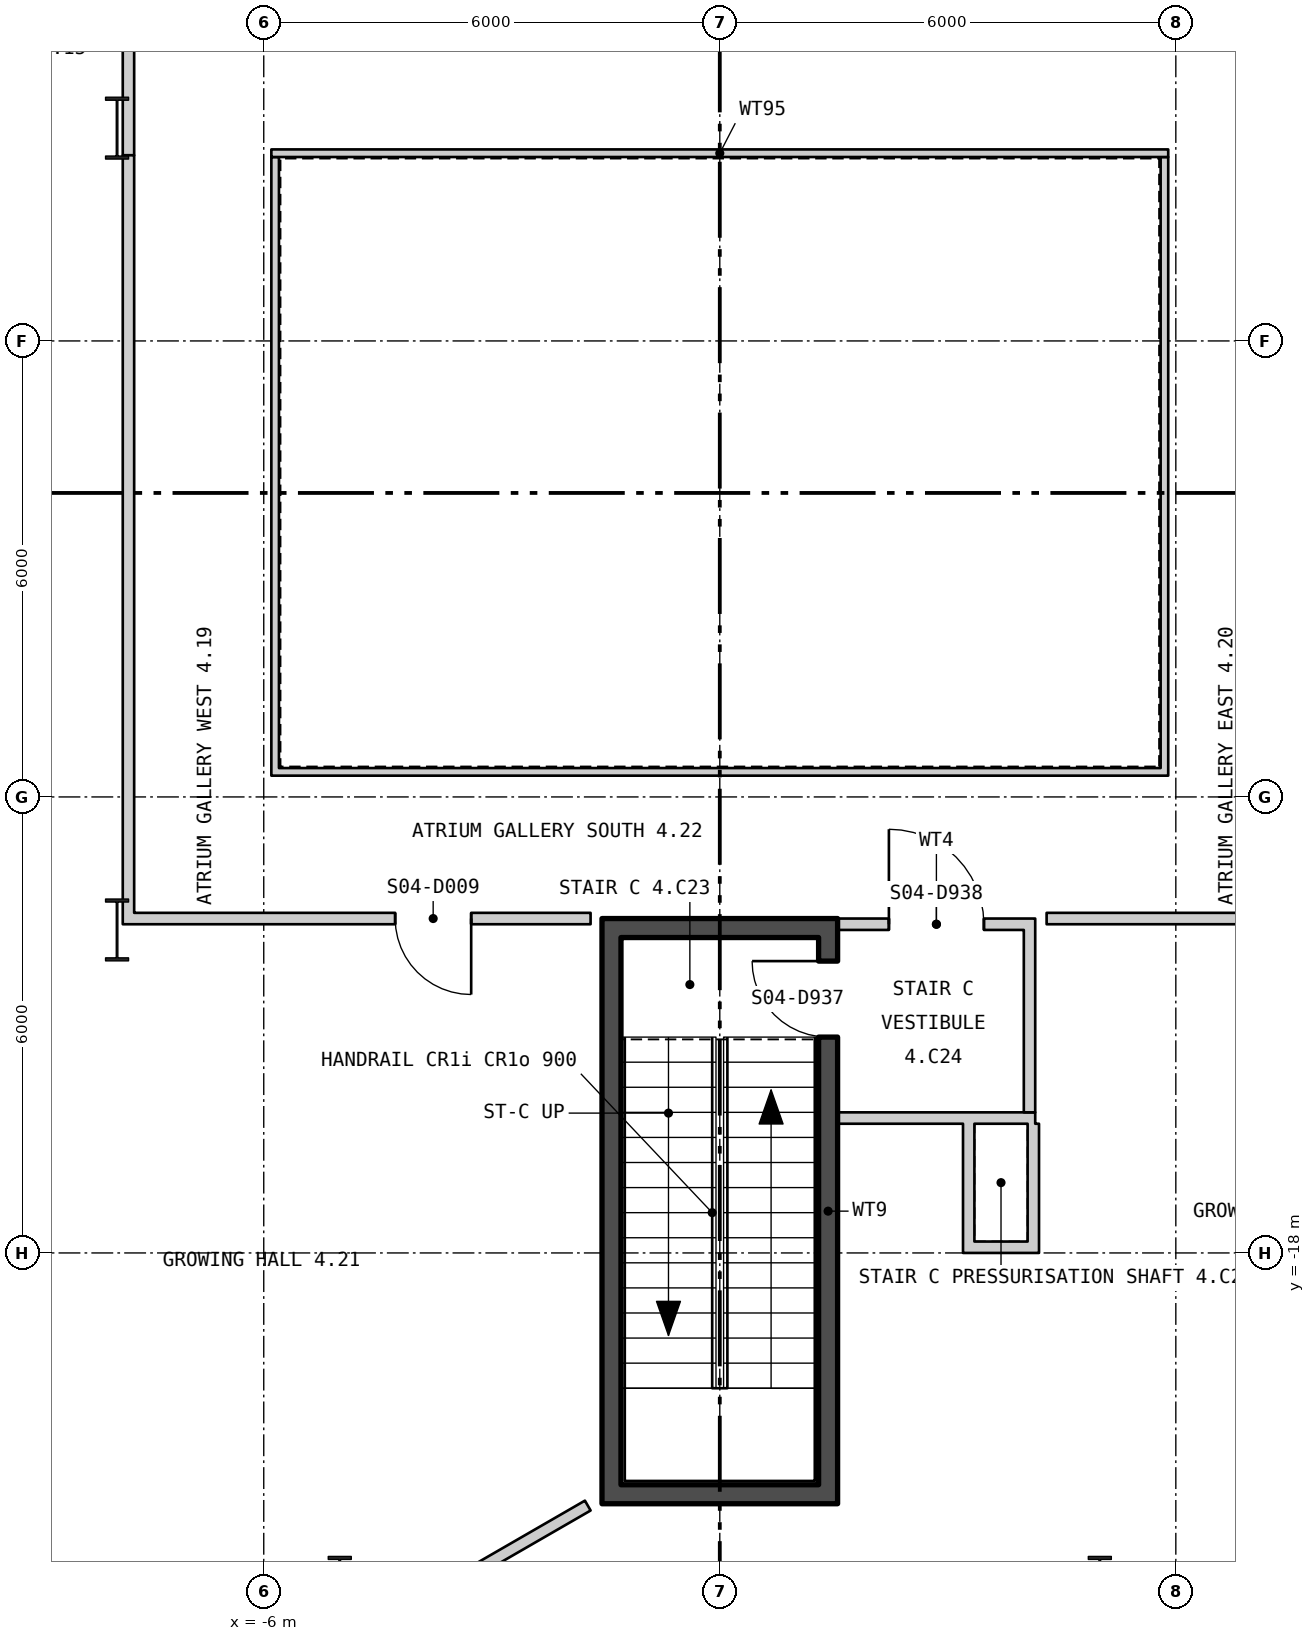
"""IFC4 building model, lengths in metres.
Left out: names, types, materials, properties, quantities, classifications, styles, units other than length and angle.
Written with IfcOpenShell. Run it as: python <this file> out.ifc"""

import sys

from ifc_helpers import new_model, si_unit, direction, frame, frame_2d, origin, origin_2d, place, context, subcontext, project, spatial, polyline, rectangle, i_section, outline, extrude, element, fill, save


model = new_model("IFC4")
c1 = context("Model", 3, precision=1e-05, world=origin(), true_north=direction((0.0, 1.0)))
c2 = subcontext(c1, "Body", "Model", "MODEL_VIEW")
j1 = project(units=[si_unit("LENGTHUNIT", "METRE"), si_unit("PLANEANGLEUNIT", "RADIAN")], contexts=[c1])
p1 = place(None, origin())
s1 = spatial("IfcSite", under=j1, at=p1, CompositionType="ELEMENT")
p2 = place(p1, origin())
s2 = spatial("IfcBuilding", under=s1, at=p2, CompositionType="ELEMENT")
p3 = place(p2, frame((0.0, 0.0, 60.3)))
s3 = spatial("IfcBuildingStorey", under=s2, at=p3, CompositionType="ELEMENT", Elevation=60.3)
for number, where, z_axis, x_axis in (
    (1, (-7.93, -3.2, 0.0), (0.0, 0.0, 1.0), (1.0, 0.0, 0.0)),
    (2, (-7.93, -13.75, 0.0), (0.0, 0.0, 1.0), (1.0, 0.0, 0.0)),
    (3, (5.0, -22.4, 0.0), (0.0, 0.0, 1.0), (1.0, 0.0, 0.0)),
    (4, (-5.0, -22.4, 0.0), (0.0, 0.0, 1.0), (1.0, 0.0, 0.0)),
):
    element("IfcColumn", number, at=place(p3, frame(where, z_axis=z_axis, x_axis=x_axis)), inside=s3, PredefinedType="COLUMN", context=c2, shape_type="SweptSolid", body=[
        extrude(i_section(OverallWidth=0.303, OverallDepth=0.814, WebThickness=0.021, FlangeThickness=0.04, at=origin_2d()), origin(), (0.0, 0.0, 1.0), 4.5),
    ])
p4 = place(p3, frame((-28.3, 10.579, -0.18), z_axis=(0.0, 0.0, 1.0), x_axis=(0.499999388847, -0.866025756634, 0.0)))
e5 = element("IfcWall", 5, at=p4, inside=s3, PredefinedType="SOLIDWALL", context=c2, shape_type="SweptSolid", body=[
    extrude(outline(polyline([(-0.13, -0.225), (45.88, -0.225), (45.62, 0.225), (0.13, 0.225), (-0.13, -0.225)])), origin(), (0.0, 0.0, 1.0), 4.28),
])
p5 = place(p4, frame((1.425, 0.0, 1.08)))
e6 = element("IfcOpeningElement", 6, at=p5, cuts=e5, PredefinedType="OPENING", context=c2, shape_type="SweptSolid", body=[
    extrude(rectangle(XDim=2.4, YDim=2.6, at=frame_2d((1.2, 1.3))), frame((0.0, 0.235, 0.0), z_axis=(0.0, -1.0, 0.0), x_axis=(1.0, 0.0, 0.0)), (0.0, 0.0, 1.0), 0.47),
])
p6 = place(p4, frame((5.895, 0.0, 1.08)))
e7 = element("IfcOpeningElement", 7, at=p6, cuts=e5, PredefinedType="OPENING", context=c2, shape_type="SweptSolid", body=[
    extrude(rectangle(XDim=2.4, YDim=2.6, at=frame_2d((1.2, 1.3))), frame((0.0, 0.235, 0.0), z_axis=(0.0, -1.0, 0.0), x_axis=(1.0, 0.0, 0.0)), (0.0, 0.0, 1.0), 0.47),
])
p7 = place(p4, frame((10.403, 0.0, 1.08)))
e8 = element("IfcOpeningElement", 8, at=p7, cuts=e5, PredefinedType="OPENING", context=c2, shape_type="SweptSolid", body=[
    extrude(rectangle(XDim=2.4, YDim=2.6, at=frame_2d((1.2, 1.3))), frame((0.0, 0.235, 0.0), z_axis=(0.0, -1.0, 0.0), x_axis=(1.0, 0.0, 0.0)), (0.0, 0.0, 1.0), 0.47),
])
p8 = place(p4, frame((14.912, 0.0, 1.08)))
e9 = element("IfcOpeningElement", 9, at=p8, cuts=e5, PredefinedType="OPENING", context=c2, shape_type="SweptSolid", body=[
    extrude(rectangle(XDim=2.4, YDim=2.6, at=frame_2d((1.2, 1.3))), frame((0.0, 0.235, 0.0), z_axis=(0.0, -1.0, 0.0), x_axis=(1.0, 0.0, 0.0)), (0.0, 0.0, 1.0), 0.47),
])
p9 = place(p4, frame((19.421, 0.0, 1.08)))
e10 = element("IfcOpeningElement", 10, at=p9, cuts=e5, PredefinedType="OPENING", context=c2, shape_type="SweptSolid", body=[
    extrude(rectangle(XDim=2.4, YDim=2.6, at=frame_2d((1.2, 1.3))), frame((0.0, 0.235, 0.0), z_axis=(0.0, -1.0, 0.0), x_axis=(1.0, 0.0, 0.0)), (0.0, 0.0, 1.0), 0.47),
])
p10 = place(p4, frame((23.929, 0.0, 1.08)))
e11 = element("IfcOpeningElement", 11, at=p10, cuts=e5, PredefinedType="OPENING", context=c2, shape_type="SweptSolid", body=[
    extrude(rectangle(XDim=2.4, YDim=2.6, at=frame_2d((1.2, 1.3))), frame((0.0, 0.235, 0.0), z_axis=(0.0, -1.0, 0.0), x_axis=(1.0, 0.0, 0.0)), (0.0, 0.0, 1.0), 0.47),
])
p11 = place(p4, frame((28.438, 0.0, 1.08)))
e12 = element("IfcOpeningElement", 12, at=p11, cuts=e5, PredefinedType="OPENING", context=c2, shape_type="SweptSolid", body=[
    extrude(rectangle(XDim=2.4, YDim=2.6, at=frame_2d((1.2, 1.3))), frame((0.0, 0.235, 0.0), z_axis=(0.0, -1.0, 0.0), x_axis=(1.0, 0.0, 0.0)), (0.0, 0.0, 1.0), 0.47),
])
p12 = place(p4, frame((32.947, 0.0, 1.08)))
e13 = element("IfcOpeningElement", 13, at=p12, cuts=e5, PredefinedType="OPENING", context=c2, shape_type="SweptSolid", body=[
    extrude(rectangle(XDim=2.4, YDim=2.6, at=frame_2d((1.2, 1.3))), frame((0.0, 0.235, 0.0), z_axis=(0.0, -1.0, 0.0), x_axis=(1.0, 0.0, 0.0)), (0.0, 0.0, 1.0), 0.47),
])
p13 = place(p4, frame((37.455, 0.0, 1.08)))
e14 = element("IfcOpeningElement", 14, at=p13, cuts=e5, PredefinedType="OPENING", context=c2, shape_type="SweptSolid", body=[
    extrude(rectangle(XDim=2.4, YDim=2.6, at=frame_2d((1.2, 1.3))), frame((0.0, 0.235, 0.0), z_axis=(0.0, -1.0, 0.0), x_axis=(1.0, 0.0, 0.0)), (0.0, 0.0, 1.0), 0.47),
])
p14 = place(p4, frame((41.925, 0.0, 1.08)))
e15 = element("IfcOpeningElement", 15, at=p14, cuts=e5, PredefinedType="OPENING", context=c2, shape_type="SweptSolid", body=[
    extrude(rectangle(XDim=2.4, YDim=2.6, at=frame_2d((1.2, 1.3))), frame((0.0, 0.235, 0.0), z_axis=(0.0, -1.0, 0.0), x_axis=(1.0, 0.0, 0.0)), (0.0, 0.0, 1.0), 0.47),
])
p15 = place(p3, frame((5.425, -29.042, -0.18), z_axis=(0.0, 0.0, 1.0), x_axis=(0.499999388847, 0.866025756634, 0.0)))
e16 = element("IfcWall", 16, at=p15, inside=s3, PredefinedType="SOLIDWALL", context=c2, shape_type="SweptSolid", body=[
    extrude(outline(polyline([(-0.13, -0.225), (45.88, -0.225), (45.62, 0.225), (0.13, 0.225), (-0.13, -0.225)])), origin(), (0.0, 0.0, 1.0), 4.28),
])
p16 = place(p15, frame((1.425, 0.0, 1.08)))
e17 = element("IfcOpeningElement", 17, at=p16, cuts=e16, PredefinedType="OPENING", context=c2, shape_type="SweptSolid", body=[
    extrude(rectangle(XDim=2.4, YDim=2.6, at=frame_2d((1.2, 1.3))), frame((0.0, 0.235, 0.0), z_axis=(0.0, -1.0, 0.0), x_axis=(1.0, 0.0, 0.0)), (0.0, 0.0, 1.0), 0.47),
])
p17 = place(p15, frame((5.895, 0.0, 1.08)))
e18 = element("IfcOpeningElement", 18, at=p17, cuts=e16, PredefinedType="OPENING", context=c2, shape_type="SweptSolid", body=[
    extrude(rectangle(XDim=2.4, YDim=2.6, at=frame_2d((1.2, 1.3))), frame((0.0, 0.235, 0.0), z_axis=(0.0, -1.0, 0.0), x_axis=(1.0, 0.0, 0.0)), (0.0, 0.0, 1.0), 0.47),
])
p18 = place(p15, frame((10.403, 0.0, 1.08)))
e19 = element("IfcOpeningElement", 19, at=p18, cuts=e16, PredefinedType="OPENING", context=c2, shape_type="SweptSolid", body=[
    extrude(rectangle(XDim=2.4, YDim=2.6, at=frame_2d((1.2, 1.3))), frame((0.0, 0.235, 0.0), z_axis=(0.0, -1.0, 0.0), x_axis=(1.0, 0.0, 0.0)), (0.0, 0.0, 1.0), 0.47),
])
p19 = place(p15, frame((14.912, 0.0, 1.08)))
e20 = element("IfcOpeningElement", 20, at=p19, cuts=e16, PredefinedType="OPENING", context=c2, shape_type="SweptSolid", body=[
    extrude(rectangle(XDim=2.4, YDim=2.6, at=frame_2d((1.2, 1.3))), frame((0.0, 0.235, 0.0), z_axis=(0.0, -1.0, 0.0), x_axis=(1.0, 0.0, 0.0)), (0.0, 0.0, 1.0), 0.47),
])
p20 = place(p15, frame((19.421, 0.0, 1.08)))
e21 = element("IfcOpeningElement", 21, at=p20, cuts=e16, PredefinedType="OPENING", context=c2, shape_type="SweptSolid", body=[
    extrude(rectangle(XDim=2.4, YDim=2.6, at=frame_2d((1.2, 1.3))), frame((0.0, 0.235, 0.0), z_axis=(0.0, -1.0, 0.0), x_axis=(1.0, 0.0, 0.0)), (0.0, 0.0, 1.0), 0.47),
])
p21 = place(p15, frame((23.929, 0.0, 1.08)))
e22 = element("IfcOpeningElement", 22, at=p21, cuts=e16, PredefinedType="OPENING", context=c2, shape_type="SweptSolid", body=[
    extrude(rectangle(XDim=2.4, YDim=2.6, at=frame_2d((1.2, 1.3))), frame((0.0, 0.235, 0.0), z_axis=(0.0, -1.0, 0.0), x_axis=(1.0, 0.0, 0.0)), (0.0, 0.0, 1.0), 0.47),
])
p22 = place(p15, frame((28.438, 0.0, 1.08)))
e23 = element("IfcOpeningElement", 23, at=p22, cuts=e16, PredefinedType="OPENING", context=c2, shape_type="SweptSolid", body=[
    extrude(rectangle(XDim=2.4, YDim=2.6, at=frame_2d((1.2, 1.3))), frame((0.0, 0.235, 0.0), z_axis=(0.0, -1.0, 0.0), x_axis=(1.0, 0.0, 0.0)), (0.0, 0.0, 1.0), 0.47),
])
p23 = place(p15, frame((32.947, 0.0, 1.08)))
e24 = element("IfcOpeningElement", 24, at=p23, cuts=e16, PredefinedType="OPENING", context=c2, shape_type="SweptSolid", body=[
    extrude(rectangle(XDim=2.4, YDim=2.6, at=frame_2d((1.2, 1.3))), frame((0.0, 0.235, 0.0), z_axis=(0.0, -1.0, 0.0), x_axis=(1.0, 0.0, 0.0)), (0.0, 0.0, 1.0), 0.47),
])
p24 = place(p15, frame((37.455, 0.0, 1.08)))
e25 = element("IfcOpeningElement", 25, at=p24, cuts=e16, PredefinedType="OPENING", context=c2, shape_type="SweptSolid", body=[
    extrude(rectangle(XDim=2.4, YDim=2.6, at=frame_2d((1.2, 1.3))), frame((0.0, 0.235, 0.0), z_axis=(0.0, -1.0, 0.0), x_axis=(1.0, 0.0, 0.0)), (0.0, 0.0, 1.0), 0.47),
])
p25 = place(p15, frame((41.925, 0.0, 1.08)))
e26 = element("IfcOpeningElement", 26, at=p25, cuts=e16, PredefinedType="OPENING", context=c2, shape_type="SweptSolid", body=[
    extrude(rectangle(XDim=2.4, YDim=2.6, at=frame_2d((1.2, 1.3))), frame((0.0, 0.235, 0.0), z_axis=(0.0, -1.0, 0.0), x_axis=(1.0, 0.0, 0.0)), (0.0, 0.0, 1.0), 0.47),
])
p26 = place(p3, frame((-5.9, -11.67, 0.0), z_axis=(0.0, 0.0, 1.0), x_axis=(1.0, 0.0, 0.0)))
e27 = element("IfcWall", 27, at=p26, inside=s3, PredefinedType="PARTITIONING", context=c2, shape_type="SweptSolid", body=[
    extrude(rectangle(XDim=11.8, YDim=0.1, at=frame_2d((5.9, 0.0))), origin(), (0.0, 0.0, 1.0), 4.3),
])
p27 = place(p3, frame((5.85, -11.62, 0.0), z_axis=(0.0, 0.0, 1.0), x_axis=(0.0, 1.0, 0.0)))
e28 = element("IfcWall", 28, at=p27, inside=s3, PredefinedType="PARTITIONING", context=c2, shape_type="SweptSolid", body=[
    extrude(rectangle(XDim=8.04, YDim=0.1, at=frame_2d((4.02, 0.0))), origin(), (0.0, 0.0, 1.0), 4.3),
])
p28 = place(p3, frame((5.9, -3.53, 0.0), z_axis=(0.0, 0.0, 1.0), x_axis=(-1.0, 0.0, 0.0)))
e29 = element("IfcWall", 29, at=p28, inside=s3, PredefinedType="PARTITIONING", context=c2, shape_type="SweptSolid", body=[
    extrude(rectangle(XDim=11.8, YDim=0.1, at=frame_2d((5.9, 0.0))), origin(), (0.0, 0.0, 1.0), 4.3),
])
p29 = place(p3, frame((-5.85, -3.58, 0.0), z_axis=(0.0, 0.0, 1.0), x_axis=(0.0, -1.0, 0.0)))
e30 = element("IfcWall", 30, at=p29, inside=s3, PredefinedType="PARTITIONING", context=c2, shape_type="SweptSolid", body=[
    extrude(rectangle(XDim=8.04, YDim=0.1, at=frame_2d((4.02, 0.0))), origin(), (0.0, 0.0, 1.0), 4.3),
])
p30 = place(p3, frame((-1.425, -21.05, 0.0), z_axis=(0.0, 0.0, 1.0), x_axis=(0.0, 1.0, 0.0)))
e31 = element("IfcWall", 31, at=p30, inside=s3, PredefinedType="SHEAR", context=c2, shape_type="SweptSolid", body=[
    extrude(rectangle(XDim=7.2, YDim=0.25, at=frame_2d((3.6, 0.0))), origin(), (0.0, 0.0, 1.0), 4.3),
])
p31 = place(p3, frame((1.425, -21.05, 0.0), z_axis=(0.0, 0.0, 1.0), x_axis=(0.0, 1.0, 0.0)))
e32 = element("IfcWall", 32, at=p31, inside=s3, PredefinedType="SHEAR", context=c2, shape_type="SweptSolid", body=[
    extrude(rectangle(XDim=7.2, YDim=0.25, at=frame_2d((3.6, 0.0))), origin(), (0.0, 0.0, 1.0), 4.3),
])
p32 = place(p31, frame((5.89, 0.0, 0.0)))
e33 = element("IfcOpeningElement", 33, at=p32, cuts=e32, PredefinedType="OPENING", context=c2, shape_type="SweptSolid", body=[
    extrude(rectangle(XDim=1.0, YDim=2.1, at=frame_2d((0.5, 1.05))), frame((0.0, 0.135, 0.0), z_axis=(0.0, -1.0, 0.0), x_axis=(1.0, 0.0, 0.0)), (0.0, 0.0, 1.0), 0.27),
])
for number, where, z_axis, x_axis in (
    (34, (-1.55, -21.175, 0.0), (0.0, 0.0, 1.0), (1.0, 0.0, 0.0)),
    (35, (-1.55, -13.725, 0.0), (0.0, 0.0, 1.0), (1.0, 0.0, 0.0)),
):
    element("IfcWall", number, at=place(p3, frame(where, z_axis=z_axis, x_axis=x_axis)), inside=s3, PredefinedType="SHEAR", context=c2, shape_type="SweptSolid", body=[
        extrude(rectangle(XDim=3.1, YDim=0.25, at=frame_2d((1.55, 0.0))), origin(), (0.0, 0.0, 1.0), 4.3),
    ])
p33 = place(p3, frame((1.55, -16.225, 0.0), z_axis=(0.0, 0.0, 1.0), x_axis=(1.0, 0.0, 0.0)))
e36 = element("IfcWall", 36, at=p33, inside=s3, PredefinedType="PARTITIONING", context=c2, shape_type="SweptSolid", body=[
    extrude(rectangle(XDim=2.6, YDim=0.15, at=frame_2d((1.3, 0.0))), origin(), (0.0, 0.0, 1.0), 4.3),
])
p34 = place(p3, frame((4.075, -16.15, 0.0), z_axis=(0.0, 0.0, 1.0), x_axis=(0.0, 1.0, 0.0)))
e37 = element("IfcWall", 37, at=p34, inside=s3, PredefinedType="PARTITIONING", context=c2, shape_type="SweptSolid", body=[
    extrude(rectangle(XDim=2.4, YDim=0.15, at=frame_2d((1.2, 0.0))), origin(), (0.0, 0.0, 1.0), 4.3),
])
p35 = place(p3, frame((1.55, -13.675, 0.0), z_axis=(0.0, 0.0, 1.0), x_axis=(1.0, 0.0, 0.0)))
e38 = element("IfcWall", 38, at=p35, inside=s3, PredefinedType="PARTITIONING", context=c2, shape_type="SweptSolid", body=[
    extrude(rectangle(XDim=2.6, YDim=0.15, at=frame_2d((1.3, 0.0))), origin(), (0.0, 0.0, 1.0), 3.39),
])
p36 = place(p35, frame((0.675, 0.0, 0.0)))
e39 = element("IfcOpeningElement", 39, at=p36, cuts=e38, PredefinedType="OPENING", context=c2, shape_type="SweptSolid", body=[
    extrude(rectangle(XDim=1.25, YDim=2.1, at=frame_2d((0.625, 1.05))), frame((0.0, 0.085, 0.0), z_axis=(0.0, -1.0, 0.0), x_axis=(1.0, 0.0, 0.0)), (0.0, 0.0, 1.0), 0.17),
])
p37 = place(p3, frame((3.275, -18.0, 0.0), z_axis=(0.0, 0.0, 1.0), x_axis=(0.0, 1.0, 0.0)))
e40 = element("IfcWall", 40, at=p37, inside=s3, PredefinedType="PARTITIONING", context=c2, shape_type="SweptSolid", body=[
    extrude(rectangle(XDim=1.7, YDim=0.15, at=frame_2d((0.85, 0.0))), origin(), (0.0, 0.0, 1.0), 3.7),
])
p38 = place(p3, frame((3.35, -17.925, 0.0), z_axis=(0.0, 0.0, 1.0), x_axis=(1.0, 0.0, 0.0)))
e41 = element("IfcWall", 41, at=p38, inside=s3, PredefinedType="PARTITIONING", context=c2, shape_type="SweptSolid", body=[
    extrude(rectangle(XDim=0.7, YDim=0.15, at=frame_2d((0.35, 0.0))), origin(), (0.0, 0.0, 1.0), 4.3),
])
p39 = place(p3, frame((4.125, -18.0, 0.0), z_axis=(0.0, 0.0, 1.0), x_axis=(0.0, 1.0, 0.0)))
e42 = element("IfcWall", 42, at=p39, inside=s3, PredefinedType="PARTITIONING", context=c2, shape_type="SweptSolid", body=[
    extrude(rectangle(XDim=1.7, YDim=0.15, at=frame_2d((0.85, 0.0))), origin(), (0.0, 0.0, 1.0), 4.3),
])
p40 = place(p3, frame((-7.78, -13.675, 0.0), z_axis=(0.0, 0.0, 1.0), x_axis=(0.0, 1.0, 0.0)))
e43 = element("IfcWall", 43, at=p40, inside=s3, PredefinedType="PARTITIONING", context=c2, shape_type="SweptSolid", body=[
    extrude(rectangle(XDim=10.118, YDim=0.15, at=frame_2d((5.059, 0.0))), origin(), (0.0, 0.0, 1.0), 3.61),
])
p41 = place(p3, frame((-7.78, -3.557, 0.0), z_axis=(0.0, 0.0, 1.0), x_axis=(0.0, 1.0, 0.0)))
e44 = element("IfcWall", 44, at=p41, inside=s3, PredefinedType="PARTITIONING", context=c2, shape_type="SweptSolid", body=[
    extrude(rectangle(XDim=3.557, YDim=0.15, at=frame_2d((1.778, 0.0))), origin(), (0.0, 0.0, 1.0), 4.3),
])
p42 = place(p41, frame((2.157, 0.0, 0.0)))
e45 = element("IfcOpeningElement", 45, at=p42, cuts=e44, PredefinedType="OPENING", context=c2, shape_type="SweptSolid", body=[
    extrude(rectangle(XDim=1.0, YDim=2.1, at=frame_2d((0.5, 1.05))), frame((0.0, 0.085, 0.0), z_axis=(0.0, -1.0, 0.0), x_axis=(1.0, 0.0, 0.0)), (0.0, 0.0, 1.0), 0.17),
])
p43 = place(p3, frame((-7.705, -13.6, 0.0), z_axis=(0.0, 0.0, 1.0), x_axis=(1.0, 0.0, 0.0)))
e46 = element("IfcWall", 46, at=p43, inside=s3, PredefinedType="PARTITIONING", context=c2, shape_type="SweptSolid", body=[
    extrude(rectangle(XDim=6.005, YDim=0.15, at=frame_2d((3.002, 0.0))), origin(), (0.0, 0.0, 1.0), 3.39),
])
p44 = place(p43, frame((3.434, 0.0, 0.0)))
e47 = element("IfcOpeningElement", 47, at=p44, cuts=e46, PredefinedType="OPENING", context=c2, shape_type="SweptSolid", body=[
    extrude(rectangle(XDim=1.0, YDim=2.1, at=frame_2d((0.5, 1.05))), frame((0.0, 0.085, 0.0), z_axis=(0.0, -1.0, 0.0), x_axis=(1.0, 0.0, 0.0)), (0.0, 0.0, 1.0), 0.17),
])
p45 = place(p3, frame((-7.261, -24.512, 0.0), z_axis=(0.0, 0.0, 1.0), x_axis=(0.866112488944, 0.499849133735, 0.0)))
e48 = element("IfcWall", 48, at=p45, inside=s3, PredefinedType="PARTITIONING", context=c2, shape_type="SweptSolid", body=[
    extrude(rectangle(XDim=6.378, YDim=0.15, at=frame_2d((3.189, 0.0))), origin(), (0.0, 0.0, 1.0), 4.3),
])
p46 = place(p3, frame((4.3, -13.6, 0.0), z_axis=(0.0, 0.0, 1.0), x_axis=(1.0, 0.0, 0.0)))
e49 = element("IfcWall", 49, at=p46, inside=s3, PredefinedType="PARTITIONING", context=c2, shape_type="SweptSolid", body=[
    extrude(rectangle(XDim=3.405, YDim=0.15, at=frame_2d((1.702, 0.0))), origin(), (0.0, 0.0, 1.0), 3.39),
])
p47 = place(p13, origin())
e50 = element("IfcWindow", 50, at=p47, inside=s3, PartitioningType="SINGLE_PANEL", PredefinedType="WINDOW", context=c2, shape_type="SweptSolid", body=[
    extrude(rectangle(XDim=2.4, YDim=2.6, at=frame_2d((1.2, 1.3))), frame((0.0, 0.105, 0.0), z_axis=(0.0, -1.0, 0.0), x_axis=(1.0, 0.0, 0.0)), (0.0, 0.0, 1.0), 0.06),
])
fill(e14, e50)
p48 = place(p32, origin())
e51 = element("IfcDoor", 51, at=p48, inside=s3, OperationType="SINGLE_SWING_LEFT", PredefinedType="DOOR", context=c2, shape_type="SweptSolid", body=[
    extrude(rectangle(XDim=1.0, YDim=2.1, at=frame_2d((0.5, 1.05))), frame((0.0, 0.025, 0.0), z_axis=(0.0, -1.0, 0.0), x_axis=(1.0, 0.0, 0.0)), (0.0, 0.0, 1.0), 0.05),
])
fill(e33, e51)
p49 = place(p36, origin())
e52 = element("IfcDoor", 52, at=p49, inside=s3, OperationType="SINGLE_SWING_RIGHT", PredefinedType="DOOR", context=c2, shape_type="SweptSolid", body=[
    extrude(rectangle(XDim=1.25, YDim=2.1, at=frame_2d((0.625, 1.05))), frame((0.0, 0.025, 0.0), z_axis=(0.0, -1.0, 0.0), x_axis=(1.0, 0.0, 0.0)), (0.0, 0.0, 1.0), 0.05),
])
fill(e39, e52)
p50 = place(p44, origin())
e53 = element("IfcDoor", 53, at=p50, inside=s3, OperationType="SINGLE_SWING_RIGHT", PredefinedType="DOOR", context=c2, shape_type="SweptSolid", body=[
    extrude(rectangle(XDim=1.0, YDim=2.1, at=frame_2d((0.5, 1.05))), frame((0.0, 0.025, 0.0), z_axis=(0.0, -1.0, 0.0), x_axis=(1.0, 0.0, 0.0)), (0.0, 0.0, 1.0), 0.05),
])
fill(e47, e53)
save(model, sys.argv[1])
